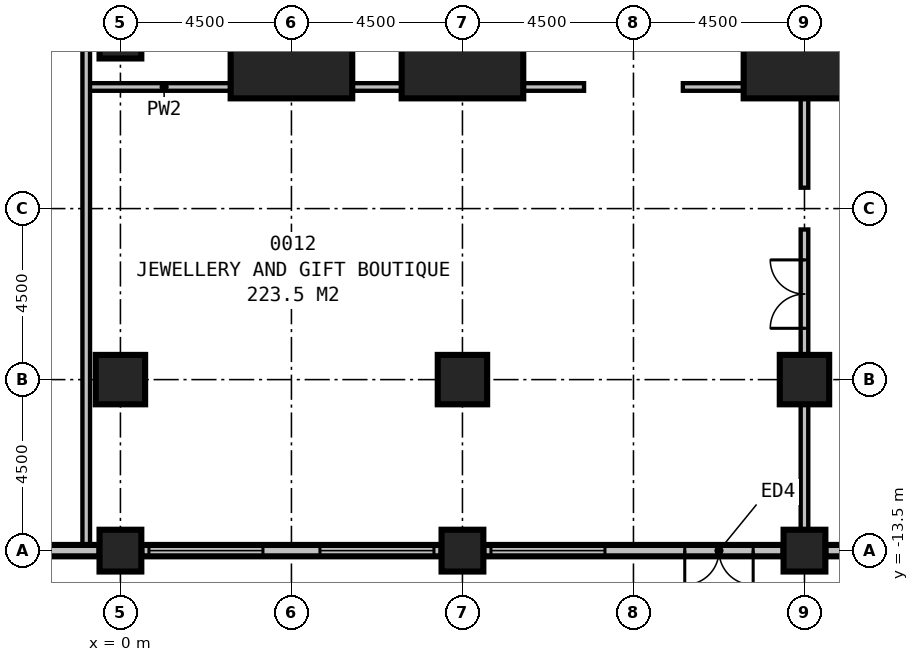
"""IFC4 building model, lengths in metres.
Left out: names, types, materials, properties, quantities, classifications, styles, units other than length and angle.
Written with IfcOpenShell. Run it as: python <this file> out.ifc"""

import sys

from ifc_helpers import new_model, si_unit, direction, frame, frame_2d, origin, origin_with_axes, origin_2d, place, context, subcontext, project, spatial, rectangle, extrude, element, fill, save


model = new_model("IFC4")
c1 = context("Model", 3, precision=1e-05, world=origin(), true_north=direction((0.0, 1.0)))
c2 = subcontext(c1, "Body", "Model", "MODEL_VIEW")
j1 = project(units=[si_unit("LENGTHUNIT", "METRE"), si_unit("PLANEANGLEUNIT", "RADIAN")], contexts=[c1])
p1 = place(None, origin())
s1 = spatial("IfcSite", under=j1, at=p1, CompositionType="ELEMENT")
p2 = place(p1, origin())
s2 = spatial("IfcBuilding", under=s1, at=p2, CompositionType="ELEMENT")
p3 = place(p2, origin())
s3 = spatial("IfcBuildingStorey", under=s2, at=p3, CompositionType="ELEMENT", Elevation=0.0)
for number, where, z_axis, x_axis in (
    (1, (4.5, 0.0, 0.0), (0.0, 0.0, 1.0), (1.0, 0.0, 0.0)),
    (2, (9.0, 0.0, 0.0), (0.0, 0.0, 1.0), (1.0, 0.0, 0.0)),
    (3, (18.0, 0.0, 0.0), (0.0, 0.0, 1.0), (1.0, 0.0, 0.0)),
):
    element("IfcColumn", number, at=place(p3, frame(where, z_axis=z_axis, x_axis=x_axis)), inside=s3, PredefinedType="COLUMN", context=c2, shape_type="SweptSolid", body=[
        extrude(rectangle(XDim=3.2, YDim=3.2, at=origin_2d()), origin(), (0.0, 0.0, 1.0), 6.0),
    ])
for number, where, z_axis, x_axis in (
    (4, (0.0, -13.5, 0.0), (0.0, 0.0, 1.0), (1.0, 0.0, 0.0)),
    (5, (9.0, -13.5, 0.0), (0.0, 0.0, 1.0), (1.0, 0.0, 0.0)),
    (6, (18.0, -13.5, 0.0), (0.0, 0.0, 1.0), (1.0, 0.0, 0.0)),
):
    element("IfcColumn", number, at=place(p3, frame(where, z_axis=z_axis, x_axis=x_axis)), inside=s3, PredefinedType="COLUMN", context=c2, shape_type="SweptSolid", body=[
        extrude(rectangle(XDim=1.1, YDim=1.1, at=origin_2d()), origin(), (0.0, 0.0, 1.0), 6.0),
    ])
for number, where, z_axis, x_axis in (
    (7, (0.0, -9.0, 0.0), (0.0, 0.0, 1.0), (1.0, 0.0, 0.0)),
    (8, (9.0, -9.0, 0.0), (0.0, 0.0, 1.0), (1.0, 0.0, 0.0)),
    (9, (18.0, -9.0, 0.0), (0.0, 0.0, 1.0), (1.0, 0.0, 0.0)),
):
    element("IfcColumn", number, at=place(p3, frame(where, z_axis=z_axis, x_axis=x_axis)), inside=s3, PredefinedType="COLUMN", context=c2, shape_type="SweptSolid", body=[
        extrude(rectangle(XDim=1.3, YDim=1.3, at=origin_2d()), origin(), (0.0, 0.0, 1.0), 6.0),
    ])
p4 = place(p3, origin_with_axes())
e10 = element("IfcColumn", 10, at=p4, inside=s3, PredefinedType="COLUMN", context=c2, shape_type="SweptSolid", body=[
    extrude(rectangle(XDim=1.1, YDim=1.1, at=origin_2d()), origin(), (0.0, 0.0, 1.0), 6.0),
])
p5 = place(p3, frame((-8.45, -13.5, 0.0), z_axis=(0.0, 0.0, 1.0), x_axis=(1.0, 0.0, 0.0)))
e11 = element("IfcWall", 11, at=p5, inside=s3, PredefinedType="STANDARD", context=c2, shape_type="SweptSolid", body=[
    extrude(rectangle(XDim=7.9, YDim=0.3, at=frame_2d((3.95, 0.0))), origin(), (0.0, 0.0, 1.0), 4.1),
])
p6 = place(p5, frame((0.2, 0.0, 0.5)))
e12 = element("IfcOpeningElement", 12, at=p6, cuts=e11, PredefinedType="OPENING", context=c2, shape_type="SweptSolid", body=[
    extrude(rectangle(XDim=3.0, YDim=3.0, at=frame_2d((1.5, 1.5))), frame((0.0, 0.16, 0.0), z_axis=(0.0, -1.0, 0.0), x_axis=(1.0, 0.0, 0.0)), (0.0, 0.0, 1.0), 0.32),
])
p7 = place(p3, frame((0.55, -13.5, 0.0), z_axis=(0.0, 0.0, 1.0), x_axis=(1.0, 0.0, 0.0)))
e13 = element("IfcWall", 13, at=p7, inside=s3, PredefinedType="STANDARD", context=c2, shape_type="SweptSolid", body=[
    extrude(rectangle(XDim=7.9, YDim=0.3, at=frame_2d((3.95, 0.0))), origin(), (0.0, 0.0, 1.0), 4.1),
])
p8 = place(p7, frame((0.2, 0.0, 0.5)))
e14 = element("IfcOpeningElement", 14, at=p8, cuts=e13, PredefinedType="OPENING", context=c2, shape_type="SweptSolid", body=[
    extrude(rectangle(XDim=3.0, YDim=3.0, at=frame_2d((1.5, 1.5))), frame((0.0, 0.16, 0.0), z_axis=(0.0, -1.0, 0.0), x_axis=(1.0, 0.0, 0.0)), (0.0, 0.0, 1.0), 0.32),
])
p9 = place(p7, frame((4.7, 0.0, 0.5)))
e15 = element("IfcOpeningElement", 15, at=p9, cuts=e13, PredefinedType="OPENING", context=c2, shape_type="SweptSolid", body=[
    extrude(rectangle(XDim=3.0, YDim=3.0, at=frame_2d((1.5, 1.5))), frame((0.0, 0.16, 0.0), z_axis=(0.0, -1.0, 0.0), x_axis=(1.0, 0.0, 0.0)), (0.0, 0.0, 1.0), 0.32),
])
p10 = place(p3, frame((9.55, -13.5, 0.0), z_axis=(0.0, 0.0, 1.0), x_axis=(1.0, 0.0, 0.0)))
e16 = element("IfcWall", 16, at=p10, inside=s3, PredefinedType="STANDARD", context=c2, shape_type="SweptSolid", body=[
    extrude(rectangle(XDim=7.9, YDim=0.3, at=frame_2d((3.95, 0.0))), origin(), (0.0, 0.0, 1.0), 4.1),
])
p11 = place(p10, frame((7.1, 0.0, 0.0), z_axis=(0.0, 0.0, 1.0), x_axis=(-1.0, 0.0, 0.0)))
e17 = element("IfcOpeningElement", 17, at=p11, cuts=e16, PredefinedType="OPENING", context=c2, shape_type="SweptSolid", body=[
    extrude(rectangle(XDim=1.8, YDim=2.4, at=frame_2d((0.9, 1.2))), frame((0.0, 0.16, 0.0), z_axis=(0.0, -1.0, 0.0), x_axis=(1.0, 0.0, 0.0)), (0.0, 0.0, 1.0), 0.32),
])
p12 = place(p10, frame((0.2, 0.0, 0.5)))
e18 = element("IfcOpeningElement", 18, at=p12, cuts=e16, PredefinedType="OPENING", context=c2, shape_type="SweptSolid", body=[
    extrude(rectangle(XDim=3.0, YDim=3.0, at=frame_2d((1.5, 1.5))), frame((0.0, 0.16, 0.0), z_axis=(0.0, -1.0, 0.0), x_axis=(1.0, 0.0, 0.0)), (0.0, 0.0, 1.0), 0.32),
])
p13 = place(p3, frame((18.55, -13.5, 0.0), z_axis=(0.0, 0.0, 1.0), x_axis=(1.0, 0.0, 0.0)))
e19 = element("IfcWall", 19, at=p13, inside=s3, PredefinedType="STANDARD", context=c2, shape_type="SweptSolid", body=[
    extrude(rectangle(XDim=7.9, YDim=0.3, at=frame_2d((3.95, 0.0))), origin(), (0.0, 0.0, 1.0), 4.1),
])
p14 = place(p13, frame((2.9, 0.0, 0.0), z_axis=(0.0, 0.0, 1.0), x_axis=(-1.0, 0.0, 0.0)))
e20 = element("IfcOpeningElement", 20, at=p14, cuts=e19, PredefinedType="OPENING", context=c2, shape_type="SweptSolid", body=[
    extrude(rectangle(XDim=2.4, YDim=3.0, at=frame_2d((1.2, 1.5))), frame((0.0, 0.16, 0.0), z_axis=(0.0, -1.0, 0.0), x_axis=(1.0, 0.0, 0.0)), (0.0, 0.0, 1.0), 0.32),
])
p15 = place(p13, frame((7.4, 0.0, 0.0), z_axis=(0.0, 0.0, 1.0), x_axis=(-1.0, 0.0, 0.0)))
e21 = element("IfcOpeningElement", 21, at=p15, cuts=e19, PredefinedType="OPENING", context=c2, shape_type="SweptSolid", body=[
    extrude(rectangle(XDim=2.4, YDim=3.0, at=frame_2d((1.2, 1.5))), frame((0.0, 0.16, 0.0), z_axis=(0.0, -1.0, 0.0), x_axis=(1.0, 0.0, 0.0)), (0.0, 0.0, 1.0), 0.32),
])
p16 = place(p3, frame((-0.9, -13.5, 0.0), z_axis=(0.0, 0.0, 1.0), x_axis=(0.0, 1.0, 0.0)))
e22 = element("IfcWall", 22, at=p16, inside=s3, PredefinedType="PARTITIONING", context=c2, shape_type="SweptSolid", body=[
    extrude(rectangle(XDim=23.9, YDim=0.2, at=frame_2d((11.95, 0.0))), origin(), (0.0, 0.0, 1.0), 4.8),
])
p17 = place(p3, frame((-0.9, -1.3, 0.0), z_axis=(0.0, 0.0, 1.0), x_axis=(1.0, 0.0, 0.0)))
e23 = element("IfcWall", 23, at=p17, inside=s3, PredefinedType="PARTITIONING", context=c2, shape_type="SweptSolid", body=[
    extrude(rectangle(XDim=4.1, YDim=0.2, at=frame_2d((2.05, 0.0))), origin(), (0.0, 0.0, 1.0), 4.8),
])
for number, where, z_axis, x_axis in (
    (24, (5.8, -1.3, 0.0), (0.0, 0.0, 1.0), (1.0, 0.0, 0.0)),
    (25, (10.3, -1.3, 0.0), (0.0, 0.0, 1.0), (1.0, 0.0, 0.0)),
    (26, (14.8, -1.3, 0.0), (0.0, 0.0, 1.0), (1.0, 0.0, 0.0)),
):
    element("IfcWall", number, at=place(p3, frame(where, z_axis=z_axis, x_axis=x_axis)), inside=s3, PredefinedType="PARTITIONING", context=c2, shape_type="SweptSolid", body=[
        extrude(rectangle(XDim=1.9, YDim=0.2, at=frame_2d((0.95, 0.0))), origin(), (0.0, 0.0, 1.0), 5.7),
    ])
p18 = place(p3, frame((18.0, -12.95, 0.0), z_axis=(0.0, 0.0, 1.0), x_axis=(0.0, 1.0, 0.0)))
e27 = element("IfcWall", 27, at=p18, inside=s3, PredefinedType="PARTITIONING", context=c2, shape_type="SweptSolid", body=[
    extrude(rectangle(XDim=3.4, YDim=0.2, at=frame_2d((1.7, 0.0))), origin(), (0.0, 0.0, 1.0), 4.8),
])
p19 = place(p3, frame((18.0, -8.45, 0.0), z_axis=(0.0, 0.0, 1.0), x_axis=(0.0, 1.0, 0.0)))
e28 = element("IfcWall", 28, at=p19, inside=s3, PredefinedType="PARTITIONING", context=c2, shape_type="SweptSolid", body=[
    extrude(rectangle(XDim=3.4, YDim=0.2, at=frame_2d((1.7, 0.0))), origin(), (0.0, 0.0, 1.0), 4.1),
])
p20 = place(p19, frame((0.8, 0.0, 0.0)))
e29 = element("IfcOpeningElement", 29, at=p20, cuts=e28, PredefinedType="OPENING", context=c2, shape_type="SweptSolid", body=[
    extrude(rectangle(XDim=1.8, YDim=2.4, at=frame_2d((0.9, 1.2))), frame((0.0, 0.11, 0.0), z_axis=(0.0, -1.0, 0.0), x_axis=(1.0, 0.0, 0.0)), (0.0, 0.0, 1.0), 0.22),
])
p21 = place(p3, frame((18.0, -3.95, 0.0), z_axis=(0.0, 0.0, 1.0), x_axis=(0.0, 1.0, 0.0)))
e30 = element("IfcWall", 30, at=p21, inside=s3, PredefinedType="PARTITIONING", context=c2, shape_type="SweptSolid", body=[
    extrude(rectangle(XDim=2.65, YDim=0.2, at=frame_2d((1.325, 0.0))), origin(), (0.0, 0.0, 1.0), 4.1),
])
p22 = place(p11, origin())
e31 = element("IfcDoor", 31, at=p22, inside=s3, OperationType="DOUBLE_DOOR_SINGLE_SWING", PredefinedType="DOOR", context=c2, shape_type="SweptSolid", body=[
    extrude(rectangle(XDim=1.8, YDim=2.4, at=frame_2d((0.9, 1.2))), frame((0.0, 0.025, 0.0), z_axis=(0.0, -1.0, 0.0), x_axis=(1.0, 0.0, 0.0)), (0.0, 0.0, 1.0), 0.05),
])
fill(e17, e31)
p23 = place(p8, origin())
e32 = element("IfcWindow", 32, at=p23, inside=s3, PartitioningType="SINGLE_PANEL", PredefinedType="WINDOW", context=c2, shape_type="SweptSolid", body=[
    extrude(rectangle(XDim=3.0, YDim=3.0, at=frame_2d((1.5, 1.5))), frame((0.0, 0.03, 0.0), z_axis=(0.0, -1.0, 0.0), x_axis=(1.0, 0.0, 0.0)), (0.0, 0.0, 1.0), 0.06),
])
fill(e14, e32)
p24 = place(p9, origin())
e33 = element("IfcWindow", 33, at=p24, inside=s3, PartitioningType="SINGLE_PANEL", PredefinedType="WINDOW", context=c2, shape_type="SweptSolid", body=[
    extrude(rectangle(XDim=3.0, YDim=3.0, at=frame_2d((1.5, 1.5))), frame((0.0, 0.03, 0.0), z_axis=(0.0, -1.0, 0.0), x_axis=(1.0, 0.0, 0.0)), (0.0, 0.0, 1.0), 0.06),
])
fill(e15, e33)
p25 = place(p12, origin())
e34 = element("IfcWindow", 34, at=p25, inside=s3, PartitioningType="SINGLE_PANEL", PredefinedType="WINDOW", context=c2, shape_type="SweptSolid", body=[
    extrude(rectangle(XDim=3.0, YDim=3.0, at=frame_2d((1.5, 1.5))), frame((0.0, 0.03, 0.0), z_axis=(0.0, -1.0, 0.0), x_axis=(1.0, 0.0, 0.0)), (0.0, 0.0, 1.0), 0.06),
])
fill(e18, e34)
p26 = place(p20, origin())
e35 = element("IfcDoor", 35, at=p26, inside=s3, OperationType="DOUBLE_DOOR_SINGLE_SWING", PredefinedType="DOOR", context=c2, shape_type="SweptSolid", body=[
    extrude(rectangle(XDim=1.8, YDim=2.4, at=frame_2d((0.9, 1.2))), frame((0.0, 0.025, 0.0), z_axis=(0.0, -1.0, 0.0), x_axis=(1.0, 0.0, 0.0)), (0.0, 0.0, 1.0), 0.05),
])
fill(e29, e35)
save(model, sys.argv[1])
